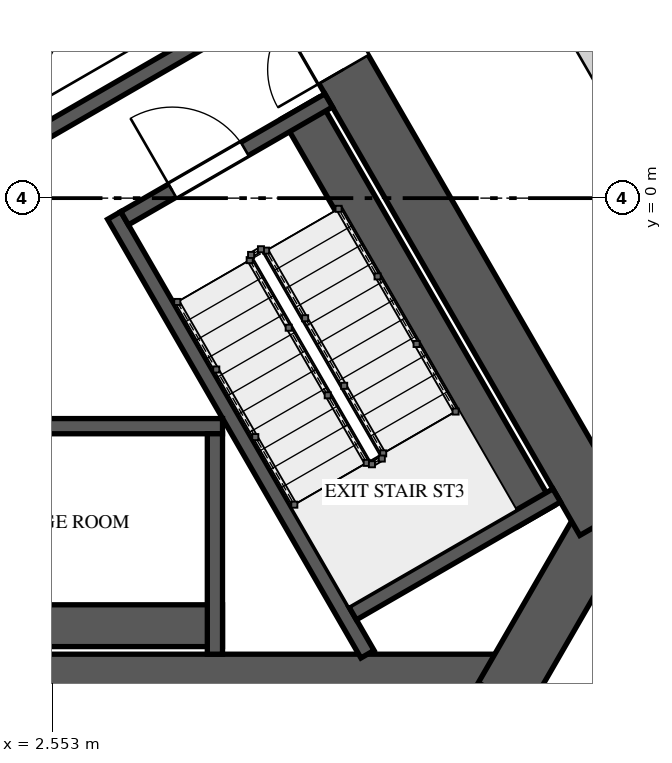
"""IFC4 building model, lengths in metres.
Left out: names, types, materials, properties, quantities, classifications, styles, units other than length and angle.
Written with IfcOpenShell. Run it as: python <this file> out.ifc"""

import sys

from ifc_helpers import new_model, si_unit, direction, frame, frame_2d, origin, place, context, subcontext, project, spatial, rectangle, extrude, element, fill, save


model = new_model("IFC4")
c1 = context("Model", 3, precision=1e-05, world=origin(), true_north=direction((0.0, 1.0)))
c2 = subcontext(c1, "Body", "Model", "MODEL_VIEW")
j1 = project(units=[si_unit("LENGTHUNIT", "METRE"), si_unit("PLANEANGLEUNIT", "RADIAN")], contexts=[c1])
p1 = place(None, origin())
s1 = spatial("IfcSite", under=j1, at=p1, CompositionType="ELEMENT")
p2 = place(p1, origin())
s2 = spatial("IfcBuilding", under=s1, at=p2, CompositionType="ELEMENT")
p3 = place(p2, frame((0.0, 0.0, 200.0)))
s3 = spatial("IfcBuildingStorey", under=s2, at=p3, CompositionType="ELEMENT", Elevation=200.0)
p4 = place(p3, frame((-8.588, -6.375, 0.0), z_axis=(0.0, 0.0, 1.0), x_axis=(1.0, 0.0, 0.0)))
e1 = element("IfcWall", 1, at=p4, inside=s3, PredefinedType="SHEAR", context=c2, shape_type="SweptSolid", body=[
    extrude(rectangle(XDim=17.176, YDim=0.75, at=frame_2d((8.588, 0.0))), origin(), (0.0, 0.0, 1.0), 4.0),
])
p5 = place(p4, frame((6.793, 0.0, 0.0)))
e2 = element("IfcOpeningElement", 2, at=p5, cuts=e1, PredefinedType="OPENING", context=c2, shape_type="SweptSolid", body=[
    extrude(rectangle(XDim=1.0, YDim=2.4, at=frame_2d((0.5, 1.2))), frame((0.0, 0.385, 0.0), z_axis=(0.0, -1.0, 0.0), x_axis=(1.0, 0.0, 0.0)), (0.0, 0.0, 1.0), 0.77),
])
p6 = place(p3, frame((8.48, -6.562, 0.0), z_axis=(0.0, 0.0, 1.0), x_axis=(0.499995765644, 0.866027848477, 0.0)))
e3 = element("IfcWall", 3, at=p6, inside=s3, PredefinedType="SHEAR", context=c2, shape_type="SweptSolid", body=[
    extrude(rectangle(XDim=2.887, YDim=0.75, at=frame_2d((1.443, 0.0))), origin(), (0.0, 0.0, 1.0), 4.0),
])
p7 = place(p3, frame((9.815, -4.25, 0.0), z_axis=(0.0, 0.0, 1.0), x_axis=(-0.500002161919, 0.866024155596, 0.0)))
e4 = element("IfcWall", 4, at=p7, inside=s3, PredefinedType="SHEAR", context=c2, shape_type="SweptSolid", body=[
    extrude(rectangle(XDim=17.176, YDim=0.75, at=frame_2d((8.588, 0.0))), origin(), (0.0, 0.0, 1.0), 4.0),
])
p8 = place(p7, frame((6.863, 0.0, 0.0)))
e5 = element("IfcOpeningElement", 5, at=p8, cuts=e4, PredefinedType="OPENING", context=c2, shape_type="SweptSolid", body=[
    extrude(rectangle(XDim=1.0, YDim=2.4, at=frame_2d((0.5, 1.2))), frame((0.0, 0.385, 0.0), z_axis=(0.0, -1.0, 0.0), x_axis=(1.0, 0.0, 0.0)), (0.0, 0.0, 1.0), 0.77),
])
p9 = place(p3, frame((8.911, -4.185, 0.0), z_axis=(0.0, 0.0, 1.0), x_axis=(-0.500009909098, 0.866019682689, 0.0)))
e6 = element("IfcWall", 6, at=p9, inside=s3, PredefinedType="SOLIDWALL", context=c2, shape_type="SweptSolid", body=[
    extrude(rectangle(XDim=6.2, YDim=0.55, at=frame_2d((3.1, 0.0))), origin(), (0.0, 0.0, 1.0), 3.65),
])
p10 = place(p3, frame((6.697, -6.0, 0.0), z_axis=(0.0, 0.0, 1.0), x_axis=(-0.499980354584, 0.866036745774, 0.0)))
e7 = element("IfcWall", 7, at=p10, inside=s3, PredefinedType="SOLIDWALL", context=c2, shape_type="SweptSolid", body=[
    extrude(rectangle(XDim=6.665, YDim=0.2, at=frame_2d((3.333, 0.0))), origin(), (0.0, 0.0, 1.0), 3.65),
])
p11 = place(p3, frame((6.501, -5.461, 0.0), z_axis=(0.0, 0.0, 1.0), x_axis=(0.86600983753, 0.500026960575, 0.0)))
e8 = element("IfcWall", 8, at=p11, inside=s3, PredefinedType="SOLIDWALL", context=c2, shape_type="SweptSolid", body=[
    extrude(rectangle(XDim=3.1, YDim=0.2, at=frame_2d((1.55, 0.0))), origin(), (0.0, 0.0, 1.0), 3.65),
])
p12 = place(p3, frame((3.501, -0.265, 0.0), z_axis=(0.0, 0.0, 1.0), x_axis=(0.866043940782, 0.499967891604, 0.0)))
e9 = element("IfcWall", 9, at=p12, inside=s3, PredefinedType="SOLIDWALL", context=c2, shape_type="SweptSolid", body=[
    extrude(rectangle(XDim=3.1, YDim=0.2, at=frame_2d((1.55, 0.0))), origin(), (0.0, 0.0, 1.0), 3.65),
])
p13 = place(p12, frame((0.725, 0.0, 0.0)))
e10 = element("IfcOpeningElement", 10, at=p13, cuts=e9, PredefinedType="OPENING", context=c2, shape_type="SweptSolid", body=[
    extrude(rectangle(XDim=1.1, YDim=2.4, at=frame_2d((0.55, 1.2))), frame((0.0, 0.11, 0.0), z_axis=(0.0, -1.0, 0.0), x_axis=(1.0, 0.0, 0.0)), (0.0, 0.0, 1.0), 0.22),
])
p14 = place(p3, frame((4.79, -3.0, 0.0), z_axis=(0.0, 0.0, 1.0), x_axis=(-1.0, 0.0, 0.0)))
e11 = element("IfcWall", 11, at=p14, inside=s3, PredefinedType="SOLIDWALL", context=c2, shape_type="SweptSolid", body=[
    extrude(rectangle(XDim=5.5, YDim=0.2, at=frame_2d((2.75, 0.0))), origin(), (0.0, 0.0, 1.0), 3.65),
])
p15 = place(p14, frame((2.275, 0.0, 0.0)))
e12 = element("IfcOpeningElement", 12, at=p15, cuts=e11, PredefinedType="OPENING", context=c2, shape_type="SweptSolid", body=[
    extrude(rectangle(XDim=0.95, YDim=2.4, at=frame_2d((0.475, 1.2))), frame((0.0, 0.11, 0.0), z_axis=(0.0, -1.0, 0.0), x_axis=(1.0, 0.0, 0.0)), (0.0, 0.0, 1.0), 0.22),
])
p16 = place(p3, frame((-0.71, -5.625, 0.0), z_axis=(0.0, 0.0, 1.0), x_axis=(1.0, 0.0, 0.0)))
e13 = element("IfcWall", 13, at=p16, inside=s3, PredefinedType="SOLIDWALL", context=c2, shape_type="SweptSolid", body=[
    extrude(rectangle(XDim=5.5, YDim=0.55, at=frame_2d((2.75, 0.0))), origin(), (0.0, 0.0, 1.0), 3.65),
])
p17 = place(p3, frame((4.69, -3.1, 0.0), z_axis=(0.0, 0.0, 1.0), x_axis=(0.0, -1.0, 0.0)))
e14 = element("IfcWall", 14, at=p17, inside=s3, PredefinedType="SOLIDWALL", context=c2, shape_type="SweptSolid", body=[
    extrude(rectangle(XDim=2.9, YDim=0.2, at=frame_2d((1.45, 0.0))), origin(), (0.0, 0.0, 1.0), 3.65),
])
p18 = place(p3, frame((2.227, 0.743, 0.0), z_axis=(0.0, 0.0, 1.0), x_axis=(0.86601746898, 0.500013743233, 0.0)))
e15 = element("IfcWall", 15, at=p18, inside=s3, PredefinedType="SOLIDWALL", context=c2, shape_type="SweptSolid", body=[
    extrude(rectangle(XDim=3.7, YDim=0.2, at=frame_2d((1.85, 0.0))), origin(), (0.0, 0.0, 1.0), 3.65),
])
p19 = place(p3, frame((9.447, 2.138, 0.0), z_axis=(0.0, 0.0, 1.0), x_axis=(0.499869636591, -0.866100656052, 0.0)))
e16 = element("IfcWall", 16, at=p19, inside=s3, PredefinedType="SOLIDWALL", context=c2, shape_type="SweptSolid", body=[
    extrude(rectangle(XDim=0.957, YDim=0.2, at=frame_2d((0.479, 0.0))), origin(), (0.0, 0.0, 1.0), 2.55),
])
p20 = place(p13, origin())
e17 = element("IfcDoor", 17, at=p20, inside=s3, OperationType="SINGLE_SWING_RIGHT", PredefinedType="DOOR", context=c2, shape_type="SweptSolid", body=[
    extrude(rectangle(XDim=1.1, YDim=2.4, at=frame_2d((0.55, 1.2))), frame((0.0, 0.025, 0.0), z_axis=(0.0, -1.0, 0.0), x_axis=(1.0, 0.0, 0.0)), (0.0, 0.0, 1.0), 0.05),
])
fill(e10, e17)
p21 = place(p8, origin())
e18 = element("IfcDoor", 18, at=p21, inside=s3, OperationType="SINGLE_SWING_LEFT", PredefinedType="DOOR", context=c2, shape_type="SweptSolid", body=[
    extrude(rectangle(XDim=1.0, YDim=2.4, at=frame_2d((0.5, 1.2))), frame((0.0, 0.025, 0.0), z_axis=(0.0, -1.0, 0.0), x_axis=(1.0, 0.0, 0.0)), (0.0, 0.0, 1.0), 0.05),
])
fill(e5, e18)
save(model, sys.argv[1])
